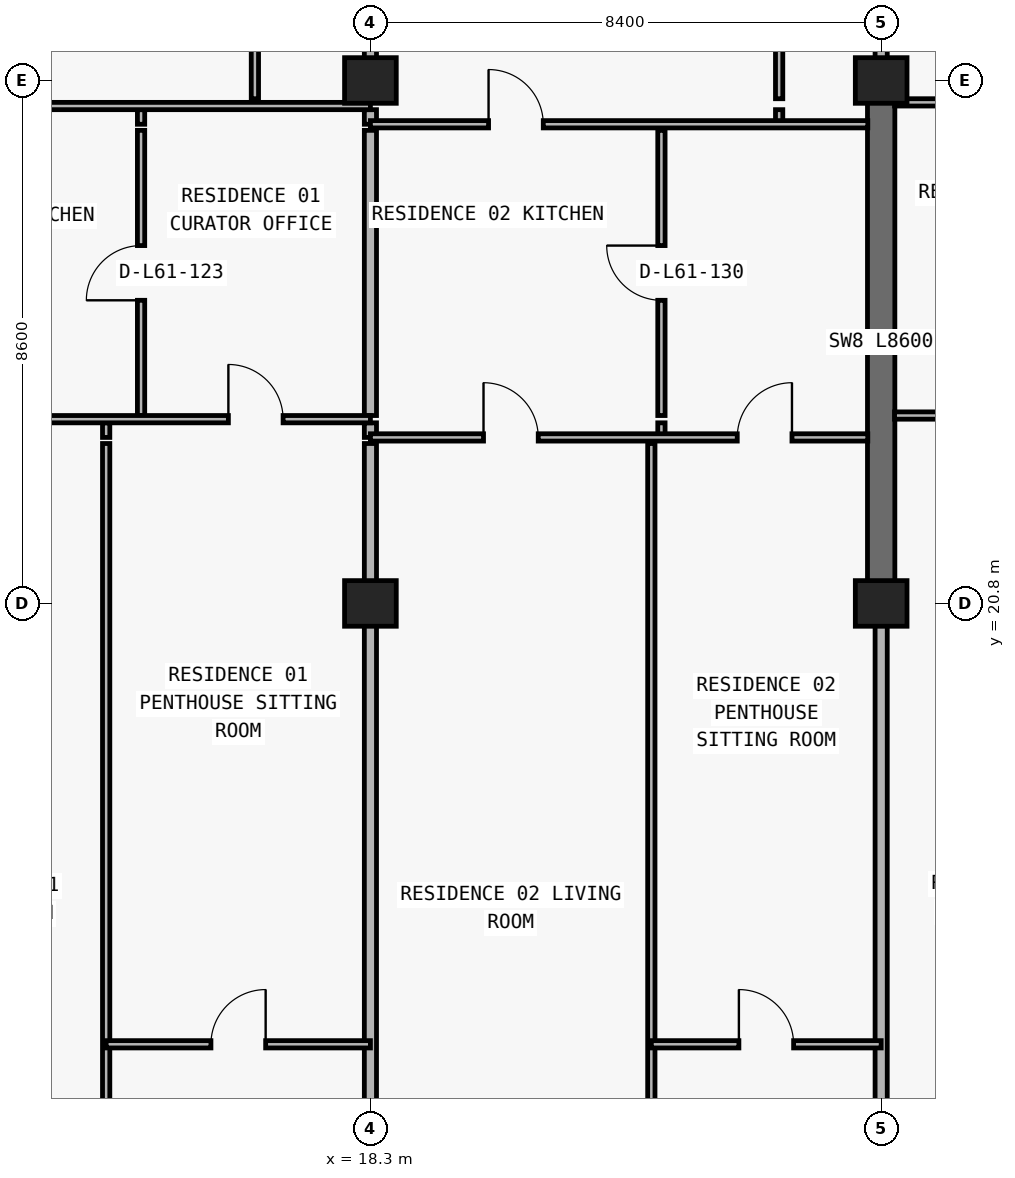
"""IFC4 building model, lengths in metres.
Left out: names, types, materials, properties, quantities, classifications, styles, units other than length and angle.
Written with IfcOpenShell. Run it as: python <this file> out.ifc"""

import sys

from ifc_helpers import new_model, si_unit, direction, frame, frame_2d, origin, origin_2d, place, context, subcontext, project, spatial, rectangle, extrude, element, fill, save


model = new_model("IFC4")
c1 = context("Model", 3, precision=1e-05, world=origin(), true_north=direction((0.0, 1.0)))
c2 = subcontext(c1, "Body", "Model", "MODEL_VIEW")
j1 = project(units=[si_unit("LENGTHUNIT", "METRE"), si_unit("PLANEANGLEUNIT", "RADIAN")], contexts=[c1])
p1 = place(None, origin())
s1 = spatial("IfcSite", under=j1, at=p1, CompositionType="ELEMENT")
p2 = place(p1, origin())
s2 = spatial("IfcBuilding", under=s1, at=p2, CompositionType="ELEMENT")
p3 = place(p2, frame((0.0, 0.0, 218.1)))
s3 = spatial("IfcBuildingStorey", under=s2, at=p3, CompositionType="ELEMENT", Elevation=218.1)
for number, where, z_axis, x_axis in (
    (1, (18.3, 20.8, 0.0), (0.0, 0.0, 1.0), (1.0, 0.0, 0.0)),
    (2, (26.7, 20.8, 0.0), (0.0, 0.0, 1.0), (1.0, 0.0, 0.0)),
    (3, (18.3, 29.4, 0.0), (0.0, 0.0, 1.0), (1.0, 0.0, 0.0)),
    (4, (26.7, 29.4, 0.0), (0.0, 0.0, 1.0), (1.0, 0.0, 0.0)),
):
    element("IfcColumn", number, at=place(p3, frame(where, z_axis=z_axis, x_axis=x_axis)), inside=s3, PredefinedType="COLUMN", context=c2, shape_type="SweptSolid", body=[
        extrude(rectangle(XDim=0.85, YDim=0.75, at=origin_2d()), origin(), (0.0, 0.0, 1.0), 3.0),
    ])
p4 = place(p3, frame((26.7, 20.8, 0.0), z_axis=(0.0, 0.0, 1.0), x_axis=(0.0, 1.0, 0.0)))
e5 = element("IfcWall", 5, at=p4, inside=s3, PredefinedType="SHEAR", context=c2, shape_type="SweptSolid", body=[
    extrude(rectangle(XDim=8.6, YDim=0.45, at=frame_2d((4.3, 0.0))), origin(), (0.0, 0.0, 1.0), 3.0),
])
p5 = place(p3, frame((13.954, 11.24, 0.0), z_axis=(0.0, 0.0, 1.0), x_axis=(0.0, 1.0, 0.0)))
e6 = element("IfcWall", 6, at=p5, inside=s3, PredefinedType="PARTITIONING", context=c2, shape_type="SweptSolid", body=[
    extrude(rectangle(XDim=12.19, YDim=0.12, at=frame_2d((6.095, 0.0))), origin(), (0.0, 0.0, 1.0), 2.449),
])
p6 = place(p3, frame((13.954, 23.53, 0.0), z_axis=(0.0, 0.0, 1.0), x_axis=(0.0, 1.0, 0.0)))
e7 = element("IfcWall", 7, at=p6, inside=s3, PredefinedType="PARTITIONING", context=c2, shape_type="SweptSolid", body=[
    extrude(rectangle(XDim=0.24, YDim=0.12, at=frame_2d((0.12, 0.0))), origin(), (0.0, 0.0, 1.0), 2.449),
])
p7 = place(p3, frame((14.528, 23.89, 0.0), z_axis=(0.0, 0.0, 1.0), x_axis=(0.0, 1.0, 0.0)))
e8 = element("IfcWall", 8, at=p7, inside=s3, PredefinedType="PARTITIONING", context=c2, shape_type="SweptSolid", body=[
    extrude(rectangle(XDim=4.69, YDim=0.12, at=frame_2d((2.345, 0.0))), origin(), (0.0, 0.0, 1.0), 3.0),
])
p8 = place(p7, frame((1.895, 0.0, 0.0)))
e9 = element("IfcOpeningElement", 9, at=p8, cuts=e8, PredefinedType="OPENING", context=c2, shape_type="SweptSolid", body=[
    extrude(rectangle(XDim=0.9, YDim=2.15, at=frame_2d((0.45, 1.075))), frame((0.0, 0.07, 0.0), z_axis=(0.0, -1.0, 0.0), x_axis=(1.0, 0.0, 0.0)), (0.0, 0.0, 1.0), 0.14),
])
p9 = place(p3, frame((14.528, 28.68, 0.0), z_axis=(0.0, 0.0, 1.0), x_axis=(0.0, 1.0, 0.0)))
e10 = element("IfcWall", 10, at=p9, inside=s3, PredefinedType="PARTITIONING", context=c2, shape_type="SweptSolid", body=[
    extrude(rectangle(XDim=0.24, YDim=0.12, at=frame_2d((0.12, 0.0))), origin(), (0.0, 0.0, 1.0), 3.0),
])
p10 = place(p3, frame((16.4, 29.1, 0.0), z_axis=(0.0, 0.0, 1.0), x_axis=(0.0, 1.0, 0.0)))
e11 = element("IfcWall", 11, at=p10, inside=s3, PredefinedType="PARTITIONING", context=c2, shape_type="SweptSolid", body=[
    extrude(rectangle(XDim=5.3, YDim=0.12, at=frame_2d((2.65, 0.0))), origin(), (0.0, 0.0, 1.0), 2.675),
])
p11 = place(p10, frame((2.225, 0.0, 0.0)))
e12 = element("IfcOpeningElement", 12, at=p11, cuts=e11, PredefinedType="OPENING", context=c2, shape_type="SweptSolid", body=[
    extrude(rectangle(XDim=0.85, YDim=2.1, at=frame_2d((0.425, 1.05))), frame((0.0, 0.07, 0.0), z_axis=(0.0, -1.0, 0.0), x_axis=(1.0, 0.0, 0.0)), (0.0, 0.0, 1.0), 0.14),
])
p12 = place(p3, frame((18.3, 11.24, 0.0), z_axis=(0.0, 0.0, 1.0), x_axis=(0.0, 1.0, 0.0)))
e13 = element("IfcWall", 13, at=p12, inside=s3, PredefinedType="PARTITIONING", context=c2, shape_type="SweptSolid", body=[
    extrude(rectangle(XDim=12.19, YDim=0.2, at=frame_2d((6.095, 0.0))), origin(), (0.0, 0.0, 1.0), 2.213),
])
p13 = place(p3, frame((18.3, 23.53, 0.0), z_axis=(0.0, 0.0, 1.0), x_axis=(0.0, 1.0, 0.0)))
e14 = element("IfcWall", 14, at=p13, inside=s3, PredefinedType="PARTITIONING", context=c2, shape_type="SweptSolid", body=[
    extrude(rectangle(XDim=0.24, YDim=0.2, at=frame_2d((0.12, 0.0))), origin(), (0.0, 0.0, 1.0), 2.213),
])
p14 = place(p3, frame((18.3, 23.89, 0.0), z_axis=(0.0, 0.0, 1.0), x_axis=(0.0, 1.0, 0.0)))
e15 = element("IfcWall", 15, at=p14, inside=s3, PredefinedType="PARTITIONING", context=c2, shape_type="SweptSolid", body=[
    extrude(rectangle(XDim=4.69, YDim=0.2, at=frame_2d((2.345, 0.0))), origin(), (0.0, 0.0, 1.0), 2.213),
])
p15 = place(p3, frame((18.3, 28.68, 0.0), z_axis=(0.0, 0.0, 1.0), x_axis=(0.0, 1.0, 0.0)))
e16 = element("IfcWall", 16, at=p15, inside=s3, PredefinedType="PARTITIONING", context=c2, shape_type="SweptSolid", body=[
    extrude(rectangle(XDim=0.24, YDim=0.2, at=frame_2d((0.12, 0.0))), origin(), (0.0, 0.0, 1.0), 2.213),
])
p16 = place(p3, frame((18.3, 29.1, 0.0), z_axis=(0.0, 0.0, 1.0), x_axis=(0.0, 1.0, 0.0)))
e17 = element("IfcWall", 17, at=p16, inside=s3, PredefinedType="PARTITIONING", context=c2, shape_type="SweptSolid", body=[
    extrude(rectangle(XDim=5.3, YDim=0.2, at=frame_2d((2.65, 0.0))), origin(), (0.0, 0.0, 1.0), 2.213),
])
p17 = place(p3, frame((22.92, 11.24, 0.0), z_axis=(0.0, 0.0, 1.0), x_axis=(0.0, 1.0, 0.0)))
e18 = element("IfcWall", 18, at=p17, inside=s3, PredefinedType="PARTITIONING", context=c2, shape_type="SweptSolid", body=[
    extrude(rectangle(XDim=12.19, YDim=0.12, at=frame_2d((6.095, 0.0))), origin(), (0.0, 0.0, 1.0), 3.0),
])
p18 = place(p3, frame((23.086, 23.53, 0.0), z_axis=(0.0, 0.0, 1.0), x_axis=(0.0, 1.0, 0.0)))
e19 = element("IfcWall", 19, at=p18, inside=s3, PredefinedType="PARTITIONING", context=c2, shape_type="SweptSolid", body=[
    extrude(rectangle(XDim=0.24, YDim=0.12, at=frame_2d((0.12, 0.0))), origin(), (0.0, 0.0, 1.0), 3.0),
])
p19 = place(p3, frame((23.086, 23.89, 0.0), z_axis=(0.0, 0.0, 1.0), x_axis=(0.0, 1.0, 0.0)))
e20 = element("IfcWall", 20, at=p19, inside=s3, PredefinedType="PARTITIONING", context=c2, shape_type="SweptSolid", body=[
    extrude(rectangle(XDim=4.69, YDim=0.12, at=frame_2d((2.345, 0.0))), origin(), (0.0, 0.0, 1.0), 3.0),
])
p20 = place(p19, frame((1.895, 0.0, 0.0)))
e21 = element("IfcOpeningElement", 21, at=p20, cuts=e20, PredefinedType="OPENING", context=c2, shape_type="SweptSolid", body=[
    extrude(rectangle(XDim=0.9, YDim=2.15, at=frame_2d((0.45, 1.075))), frame((0.0, 0.07, 0.0), z_axis=(0.0, -1.0, 0.0), x_axis=(1.0, 0.0, 0.0)), (0.0, 0.0, 1.0), 0.14),
])
p21 = place(p3, frame((25.022, 28.68, 0.0), z_axis=(0.0, 0.0, 1.0), x_axis=(0.0, 1.0, 0.0)))
e22 = element("IfcWall", 22, at=p21, inside=s3, PredefinedType="PARTITIONING", context=c2, shape_type="SweptSolid", body=[
    extrude(rectangle(XDim=0.24, YDim=0.12, at=frame_2d((0.12, 0.0))), origin(), (0.0, 0.0, 1.0), 3.0),
])
p22 = place(p3, frame((25.022, 29.1, 0.0), z_axis=(0.0, 0.0, 1.0), x_axis=(0.0, 1.0, 0.0)))
e23 = element("IfcWall", 23, at=p22, inside=s3, PredefinedType="PARTITIONING", context=c2, shape_type="SweptSolid", body=[
    extrude(rectangle(XDim=5.3, YDim=0.12, at=frame_2d((2.65, 0.0))), origin(), (0.0, 0.0, 1.0), 3.0),
])
p23 = place(p22, frame((2.225, 0.0, 0.0)))
e24 = element("IfcOpeningElement", 24, at=p23, cuts=e23, PredefinedType="OPENING", context=c2, shape_type="SweptSolid", body=[
    extrude(rectangle(XDim=0.85, YDim=2.1, at=frame_2d((0.425, 1.05))), frame((0.0, 0.07, 0.0), z_axis=(0.0, -1.0, 0.0), x_axis=(1.0, 0.0, 0.0)), (0.0, 0.0, 1.0), 0.14),
])
p24 = place(p3, frame((26.7, 11.24, 0.0), z_axis=(0.0, 0.0, 1.0), x_axis=(0.0, 1.0, 0.0)))
e25 = element("IfcWall", 25, at=p24, inside=s3, PredefinedType="PARTITIONING", context=c2, shape_type="SweptSolid", body=[
    extrude(rectangle(XDim=9.555, YDim=0.2, at=frame_2d((4.777, 0.0))), origin(), (0.0, 0.0, 1.0), 2.213),
])
p25 = place(p3, frame((26.7, 29.405, 0.0), z_axis=(0.0, 0.0, 1.0), x_axis=(0.0, 1.0, 0.0)))
e26 = element("IfcWall", 26, at=p25, inside=s3, PredefinedType="PARTITIONING", context=c2, shape_type="SweptSolid", body=[
    extrude(rectangle(XDim=4.995, YDim=0.2, at=frame_2d((2.498, 0.0))), origin(), (0.0, 0.0, 1.0), 2.285),
])
p26 = place(p3, frame((13.954, 13.55, 0.0), z_axis=(0.0, 0.0, 1.0), x_axis=(1.0, 0.0, 0.0)))
e27 = element("IfcWall", 27, at=p26, inside=s3, PredefinedType="PARTITIONING", context=c2, shape_type="SweptSolid", body=[
    extrude(rectangle(XDim=4.346, YDim=0.12, at=frame_2d((2.173, 0.0))), origin(), (0.0, 0.0, 1.0), 3.0),
])
p27 = place(p26, frame((1.723, 0.0, 0.0)))
e28 = element("IfcOpeningElement", 28, at=p27, cuts=e27, PredefinedType="OPENING", context=c2, shape_type="SweptSolid", body=[
    extrude(rectangle(XDim=0.9, YDim=2.15, at=frame_2d((0.45, 1.075))), frame((0.0, 0.07, 0.0), z_axis=(0.0, -1.0, 0.0), x_axis=(1.0, 0.0, 0.0)), (0.0, 0.0, 1.0), 0.14),
])
p28 = place(p3, frame((22.92, 13.55, 0.0), z_axis=(0.0, 0.0, 1.0), x_axis=(1.0, 0.0, 0.0)))
e29 = element("IfcWall", 29, at=p28, inside=s3, PredefinedType="PARTITIONING", context=c2, shape_type="SweptSolid", body=[
    extrude(rectangle(XDim=3.78, YDim=0.12, at=frame_2d((1.89, 0.0))), origin(), (0.0, 0.0, 1.0), 3.0),
])
p29 = place(p28, frame((1.44, 0.0, 0.0)))
e30 = element("IfcOpeningElement", 30, at=p29, cuts=e29, PredefinedType="OPENING", context=c2, shape_type="SweptSolid", body=[
    extrude(rectangle(XDim=0.9, YDim=2.15, at=frame_2d((0.45, 1.075))), frame((0.0, 0.07, 0.0), z_axis=(0.0, -1.0, 0.0), x_axis=(1.0, 0.0, 0.0)), (0.0, 0.0, 1.0), 0.14),
])
p30 = place(p3, frame((18.3, 23.53, 0.0), z_axis=(0.0, 0.0, 1.0), x_axis=(1.0, 0.0, 0.0)))
e31 = element("IfcWall", 31, at=p30, inside=s3, PredefinedType="PARTITIONING", context=c2, shape_type="SweptSolid", body=[
    extrude(rectangle(XDim=8.18, YDim=0.12, at=frame_2d((4.09, 0.0))), origin(), (0.0, 0.0, 1.0), 3.0),
])
p31 = place(p30, frame((1.86, 0.0, 0.0)))
e32 = element("IfcOpeningElement", 32, at=p31, cuts=e31, PredefinedType="OPENING", context=c2, shape_type="SweptSolid", body=[
    extrude(rectangle(XDim=0.9, YDim=2.15, at=frame_2d((0.45, 1.075))), frame((0.0, 0.07, 0.0), z_axis=(0.0, -1.0, 0.0), x_axis=(1.0, 0.0, 0.0)), (0.0, 0.0, 1.0), 0.14),
])
p32 = place(p30, frame((6.033, 0.0, 0.0)))
e33 = element("IfcOpeningElement", 33, at=p32, cuts=e31, PredefinedType="OPENING", context=c2, shape_type="SweptSolid", body=[
    extrude(rectangle(XDim=0.9, YDim=2.15, at=frame_2d((0.45, 1.075))), frame((0.0, 0.07, 0.0), z_axis=(0.0, -1.0, 0.0), x_axis=(1.0, 0.0, 0.0)), (0.0, 0.0, 1.0), 0.14),
])
p33 = place(p3, frame((10.1, 23.83, 0.0), z_axis=(0.0, 0.0, 1.0), x_axis=(1.0, 0.0, 0.0)))
e34 = element("IfcWall", 34, at=p33, inside=s3, PredefinedType="PARTITIONING", context=c2, shape_type="SweptSolid", body=[
    extrude(rectangle(XDim=8.2, YDim=0.12, at=frame_2d((4.1, 0.0))), origin(), (0.0, 0.0, 1.0), 3.0),
])
p34 = place(p33, frame((1.477, 0.0, 0.0)))
e35 = element("IfcOpeningElement", 35, at=p34, cuts=e34, PredefinedType="OPENING", context=c2, shape_type="SweptSolid", body=[
    extrude(rectangle(XDim=0.9, YDim=2.15, at=frame_2d((0.45, 1.075))), frame((0.0, 0.07, 0.0), z_axis=(0.0, -1.0, 0.0), x_axis=(1.0, 0.0, 0.0)), (0.0, 0.0, 1.0), 0.14),
])
p35 = place(p33, frame((5.864, 0.0, 0.0)))
e36 = element("IfcOpeningElement", 36, at=p35, cuts=e34, PredefinedType="OPENING", context=c2, shape_type="SweptSolid", body=[
    extrude(rectangle(XDim=0.9, YDim=2.15, at=frame_2d((0.45, 1.075))), frame((0.0, 0.07, 0.0), z_axis=(0.0, -1.0, 0.0), x_axis=(1.0, 0.0, 0.0)), (0.0, 0.0, 1.0), 0.14),
])
p36 = place(p3, frame((26.92, 23.89, 0.0), z_axis=(0.0, 0.0, 1.0), x_axis=(1.0, 0.0, 0.0)))
e37 = element("IfcWall", 37, at=p36, inside=s3, PredefinedType="PARTITIONING", context=c2, shape_type="SweptSolid", body=[
    extrude(rectangle(XDim=8.18, YDim=0.12, at=frame_2d((4.09, 0.0))), origin(), (0.0, 0.0, 1.0), 3.0),
])
p37 = place(p36, frame((1.414, 0.0, 0.0)))
e38 = element("IfcOpeningElement", 38, at=p37, cuts=e37, PredefinedType="OPENING", context=c2, shape_type="SweptSolid", body=[
    extrude(rectangle(XDim=0.9, YDim=2.15, at=frame_2d((0.45, 1.075))), frame((0.0, 0.07, 0.0), z_axis=(0.0, -1.0, 0.0), x_axis=(1.0, 0.0, 0.0)), (0.0, 0.0, 1.0), 0.14),
])
p38 = place(p36, frame((5.673, 0.0, 0.0)))
e39 = element("IfcOpeningElement", 39, at=p38, cuts=e37, PredefinedType="OPENING", context=c2, shape_type="SweptSolid", body=[
    extrude(rectangle(XDim=0.9, YDim=2.15, at=frame_2d((0.45, 1.075))), frame((0.0, 0.07, 0.0), z_axis=(0.0, -1.0, 0.0), x_axis=(1.0, 0.0, 0.0)), (0.0, 0.0, 1.0), 0.14),
])
p39 = place(p3, frame((18.3, 28.68, 0.0), z_axis=(0.0, 0.0, 1.0), x_axis=(1.0, 0.0, 0.0)))
e40 = element("IfcWall", 40, at=p39, inside=s3, PredefinedType="PARTITIONING", context=c2, shape_type="SweptSolid", body=[
    extrude(rectangle(XDim=8.18, YDim=0.12, at=frame_2d((4.09, 0.0))), origin(), (0.0, 0.0, 1.0), 3.0),
])
p40 = place(p39, frame((1.943, 0.0, 0.0)))
e41 = element("IfcOpeningElement", 41, at=p40, cuts=e40, PredefinedType="OPENING", context=c2, shape_type="SweptSolid", body=[
    extrude(rectangle(XDim=0.9, YDim=2.15, at=frame_2d((0.45, 1.075))), frame((0.0, 0.07, 0.0), z_axis=(0.0, -1.0, 0.0), x_axis=(1.0, 0.0, 0.0)), (0.0, 0.0, 1.0), 0.14),
])
p41 = place(p3, frame((10.1, 28.98, 0.0), z_axis=(0.0, 0.0, 1.0), x_axis=(1.0, 0.0, 0.0)))
e42 = element("IfcWall", 42, at=p41, inside=s3, PredefinedType="PARTITIONING", context=c2, shape_type="SweptSolid", body=[
    extrude(rectangle(XDim=8.2, YDim=0.12, at=frame_2d((4.1, 0.0))), origin(), (0.0, 0.0, 1.0), 3.0),
])
p42 = place(p41, frame((1.764, 0.0, 0.0)))
e43 = element("IfcOpeningElement", 43, at=p42, cuts=e42, PredefinedType="OPENING", context=c2, shape_type="SweptSolid", body=[
    extrude(rectangle(XDim=0.9, YDim=2.15, at=frame_2d((0.45, 1.075))), frame((0.0, 0.07, 0.0), z_axis=(0.0, -1.0, 0.0), x_axis=(1.0, 0.0, 0.0)), (0.0, 0.0, 1.0), 0.14),
])
p43 = place(p3, frame((26.92, 29.04, 0.0), z_axis=(0.0, 0.0, 1.0), x_axis=(1.0, 0.0, 0.0)))
e44 = element("IfcWall", 44, at=p43, inside=s3, PredefinedType="PARTITIONING", context=c2, shape_type="SweptSolid", body=[
    extrude(rectangle(XDim=8.18, YDim=0.12, at=frame_2d((4.09, 0.0))), origin(), (0.0, 0.0, 1.0), 3.0),
])
p44 = place(p43, frame((1.583, 0.0, 0.0)))
e45 = element("IfcOpeningElement", 45, at=p44, cuts=e44, PredefinedType="OPENING", context=c2, shape_type="SweptSolid", body=[
    extrude(rectangle(XDim=0.9, YDim=2.15, at=frame_2d((0.45, 1.075))), frame((0.0, 0.07, 0.0), z_axis=(0.0, -1.0, 0.0), x_axis=(1.0, 0.0, 0.0)), (0.0, 0.0, 1.0), 0.14),
])
p45 = place(p8, origin())
e46 = element("IfcDoor", 46, at=p45, inside=s3, OperationType="SINGLE_SWING_LEFT", PredefinedType="DOOR", context=c2, shape_type="SweptSolid", body=[
    extrude(rectangle(XDim=0.9, YDim=2.15, at=frame_2d((0.45, 1.075))), frame((0.0, 0.025, 0.0), z_axis=(0.0, -1.0, 0.0), x_axis=(1.0, 0.0, 0.0)), (0.0, 0.0, 1.0), 0.05),
])
fill(e9, e46)
p46 = place(p35, origin())
e47 = element("IfcDoor", 47, at=p46, inside=s3, OperationType="SINGLE_SWING_LEFT", PredefinedType="DOOR", context=c2, shape_type="SweptSolid", body=[
    extrude(rectangle(XDim=0.9, YDim=2.15, at=frame_2d((0.45, 1.075))), frame((0.0, 0.025, 0.0), z_axis=(0.0, -1.0, 0.0), x_axis=(1.0, 0.0, 0.0)), (0.0, 0.0, 1.0), 0.05),
])
fill(e36, e47)
p47 = place(p27, origin())
e48 = element("IfcDoor", 48, at=p47, inside=s3, OperationType="SINGLE_SWING_RIGHT", PredefinedType="DOOR", context=c2, shape_type="SweptSolid", body=[
    extrude(rectangle(XDim=0.9, YDim=2.15, at=frame_2d((0.45, 1.075))), frame((0.0, 0.025, 0.0), z_axis=(0.0, -1.0, 0.0), x_axis=(1.0, 0.0, 0.0)), (0.0, 0.0, 1.0), 0.05),
])
fill(e28, e48)
p48 = place(p40, origin())
e49 = element("IfcDoor", 49, at=p48, inside=s3, OperationType="SINGLE_SWING_LEFT", PredefinedType="DOOR", context=c2, shape_type="SweptSolid", body=[
    extrude(rectangle(XDim=0.9, YDim=2.15, at=frame_2d((0.45, 1.075))), frame((0.0, 0.025, 0.0), z_axis=(0.0, -1.0, 0.0), x_axis=(1.0, 0.0, 0.0)), (0.0, 0.0, 1.0), 0.05),
])
fill(e41, e49)
p49 = place(p20, origin())
e50 = element("IfcDoor", 50, at=p49, inside=s3, OperationType="SINGLE_SWING_RIGHT", PredefinedType="DOOR", context=c2, shape_type="SweptSolid", body=[
    extrude(rectangle(XDim=0.9, YDim=2.15, at=frame_2d((0.45, 1.075))), frame((0.0, 0.025, 0.0), z_axis=(0.0, -1.0, 0.0), x_axis=(1.0, 0.0, 0.0)), (0.0, 0.0, 1.0), 0.05),
])
fill(e21, e50)
p50 = place(p31, origin())
e51 = element("IfcDoor", 51, at=p50, inside=s3, OperationType="SINGLE_SWING_LEFT", PredefinedType="DOOR", context=c2, shape_type="SweptSolid", body=[
    extrude(rectangle(XDim=0.9, YDim=2.15, at=frame_2d((0.45, 1.075))), frame((0.0, 0.025, 0.0), z_axis=(0.0, -1.0, 0.0), x_axis=(1.0, 0.0, 0.0)), (0.0, 0.0, 1.0), 0.05),
])
fill(e32, e51)
p51 = place(p32, origin())
e52 = element("IfcDoor", 52, at=p51, inside=s3, OperationType="SINGLE_SWING_RIGHT", PredefinedType="DOOR", context=c2, shape_type="SweptSolid", body=[
    extrude(rectangle(XDim=0.9, YDim=2.15, at=frame_2d((0.45, 1.075))), frame((0.0, 0.025, 0.0), z_axis=(0.0, -1.0, 0.0), x_axis=(1.0, 0.0, 0.0)), (0.0, 0.0, 1.0), 0.05),
])
fill(e33, e52)
p52 = place(p29, origin())
e53 = element("IfcDoor", 53, at=p52, inside=s3, OperationType="SINGLE_SWING_LEFT", PredefinedType="DOOR", context=c2, shape_type="SweptSolid", body=[
    extrude(rectangle(XDim=0.9, YDim=2.15, at=frame_2d((0.45, 1.075))), frame((0.0, 0.025, 0.0), z_axis=(0.0, -1.0, 0.0), x_axis=(1.0, 0.0, 0.0)), (0.0, 0.0, 1.0), 0.05),
])
fill(e30, e53)
save(model, sys.argv[1])
